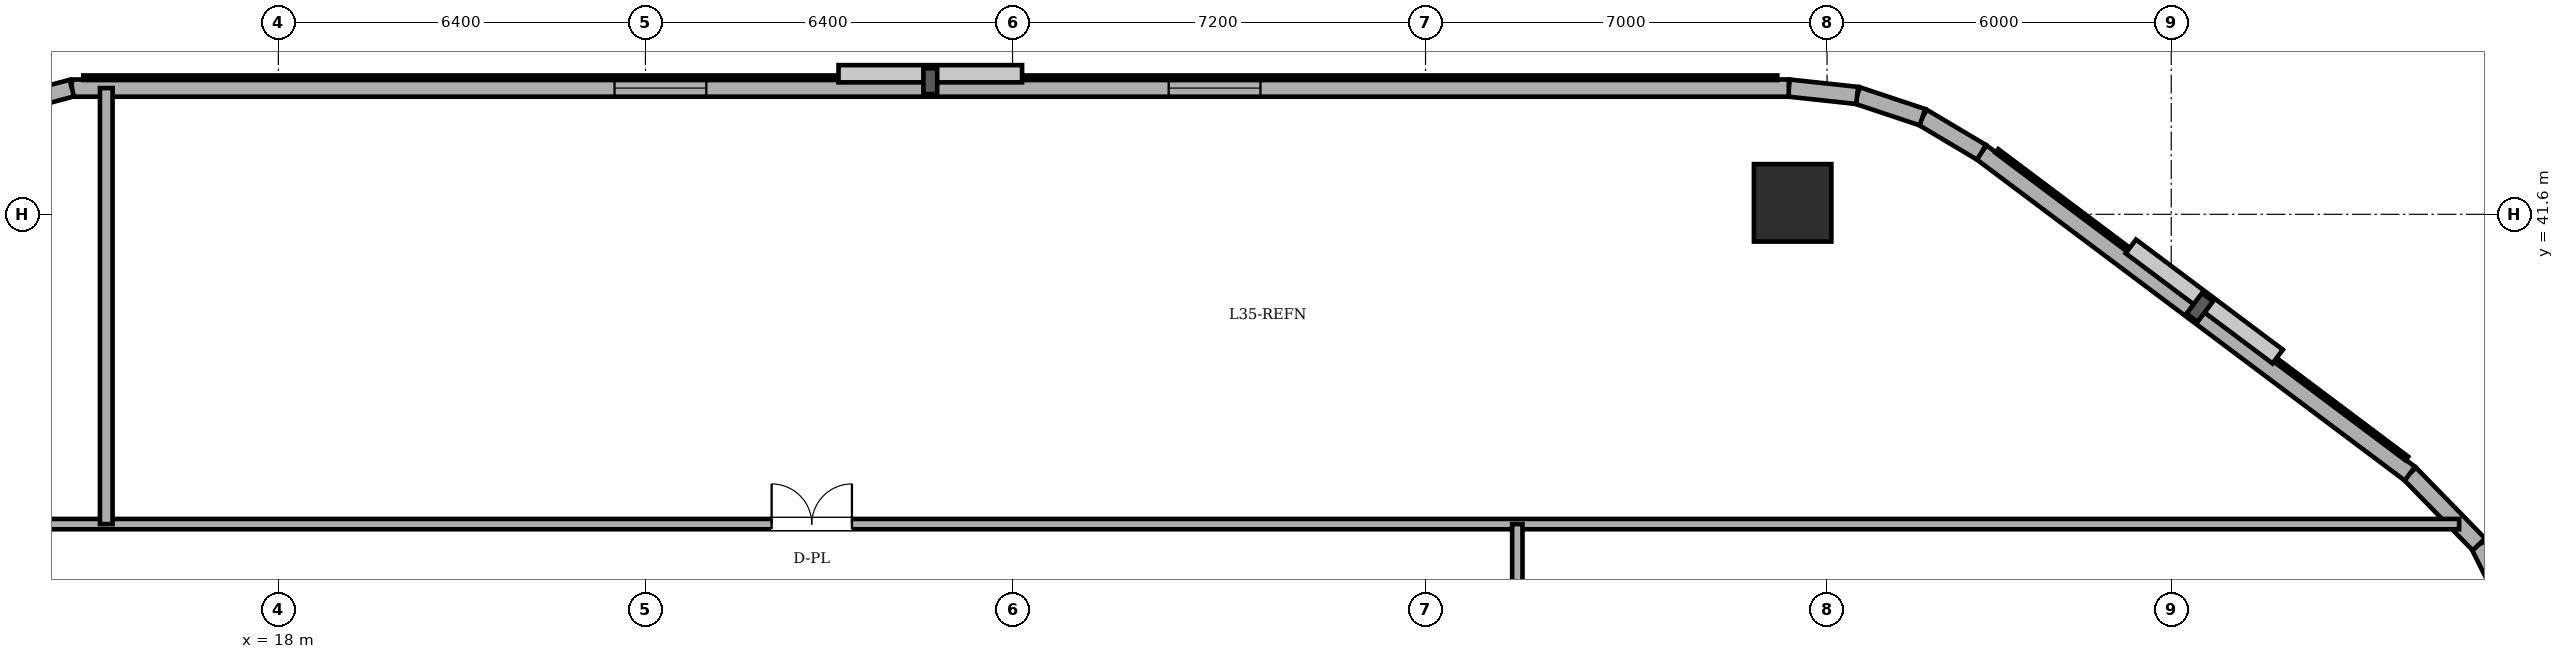
"""IFC4 building model, lengths in metres.
Left out: names, types, materials, properties, quantities, classifications, styles, units other than length and angle.
Written with IfcOpenShell. Run it as: python <this file> out.ifc"""

import sys

from ifc_helpers import new_model, si_unit, direction, frame, frame_2d, origin, origin_2d, place, context, subcontext, project, spatial, rectangle, circle, extrude, element, fill, save


model = new_model("IFC4")
c1 = context("Model", 3, precision=1e-05, world=origin(), true_north=direction((0.0, 1.0)))
c2 = subcontext(c1, "Body", "Model", "MODEL_VIEW")
j1 = project(units=[si_unit("LENGTHUNIT", "METRE"), si_unit("PLANEANGLEUNIT", "RADIAN")], contexts=[c1])
p1 = place(None, origin())
s1 = spatial("IfcSite", under=j1, at=p1, CompositionType="ELEMENT")
p2 = place(p1, origin())
s2 = spatial("IfcBuilding", under=s1, at=p2, CompositionType="ELEMENT")
p3 = place(p2, frame((0.0, 0.0, 133.1)))
s3 = spatial("IfcBuildingStorey", under=s2, at=p3, CompositionType="ELEMENT", Elevation=133.1)
p4 = place(p3, frame((44.4, 41.8, 0.0), z_axis=(0.0, 0.0, 1.0), x_axis=(1.0, 0.0, 0.0)))
e1 = element("IfcColumn", 1, at=p4, inside=s3, PredefinedType="COLUMN", context=c2, shape_type="SweptSolid", body=[
    extrude(circle(Radius=0.675, at=origin_2d()), origin(), (0.0, 0.0, 1.0), 2.96),
])
for number, where, z_axis, x_axis in (
    (2, (57.135, 34.304, 0.0), (0.0, 0.0, 1.0), (-0.447, 0.894, 0.0)),
    (3, (56.364, 35.846, 0.0), (0.0, 0.0, 1.0), (-0.698, 0.716, 0.0)),
):
    element("IfcWall", number, at=place(p3, frame(where, z_axis=z_axis, x_axis=x_axis)), inside=s3, PredefinedType="SOLIDWALL", context=c2, shape_type="SweptSolid", body=[
        extrude(rectangle(XDim=1.724, YDim=0.3, at=frame_2d((0.862, 0.0))), origin(), (0.0, 0.0, 1.0), 5.36),
    ])
p5 = place(p3, frame((55.16, 37.08, 0.0), z_axis=(0.0, 0.0, 1.0), x_axis=(-0.800012555607, 0.599983258826, 0.0)))
e4 = element("IfcWall", 4, at=p5, inside=s3, PredefinedType="SOLIDWALL", context=c2, shape_type="SweptSolid", body=[
    extrude(rectangle(XDim=9.333, YDim=0.3, at=frame_2d((4.667, 0.0))), origin(), (0.0, 0.0, 1.0), 5.36),
])
p6 = place(p3, frame((47.693, 42.68, 0.0), z_axis=(0.0, 0.0, 1.0), x_axis=(-0.859320591642, 0.511437308749, 0.0)))
e5 = element("IfcWall", 5, at=p6, inside=s3, PredefinedType="SOLIDWALL", context=c2, shape_type="SweptSolid", body=[
    extrude(rectangle(XDim=1.199, YDim=0.3, at=frame_2d((0.599, 0.0))), origin(), (0.0, 0.0, 1.0), 5.36),
])
p7 = place(p3, frame((46.663, 43.293, 0.0), z_axis=(0.0, 0.0, 1.0), x_axis=(-0.948744332129, 0.316044604847, 0.0)))
e6 = element("IfcWall", 6, at=p7, inside=s3, PredefinedType="SOLIDWALL", context=c2, shape_type="SweptSolid", body=[
    extrude(rectangle(XDim=1.2, YDim=0.3, at=frame_2d((0.6, 0.0))), origin(), (0.0, 0.0, 1.0), 5.36),
])
p8 = place(p3, frame((45.525, 43.672, 0.0), z_axis=(0.0, 0.0, 1.0), x_axis=(-0.994289103787, 0.106720092254, 0.0)))
e7 = element("IfcWall", 7, at=p8, inside=s3, PredefinedType="SOLIDWALL", context=c2, shape_type="SweptSolid", body=[
    extrude(rectangle(XDim=1.199, YDim=0.3, at=frame_2d((0.599, 0.0))), origin(), (0.0, 0.0, 1.0), 5.36),
])
p9 = place(p3, frame((44.333, 43.8, 0.0), z_axis=(0.0, 0.0, 1.0), x_axis=(-1.0, 0.0, 0.0)))
e8 = element("IfcWall", 8, at=p9, inside=s3, PredefinedType="SOLIDWALL", context=c2, shape_type="SweptSolid", body=[
    extrude(rectangle(XDim=29.933, YDim=0.3, at=frame_2d((14.967, 0.0))), origin(), (0.0, 0.0, 1.0), 5.36),
])
p10 = place(p9, frame((9.211, 0.0, 0.85)))
e9 = element("IfcOpeningElement", 9, at=p10, cuts=e8, PredefinedType="OPENING", context=c2, shape_type="SweptSolid", body=[
    extrude(rectangle(XDim=1.6, YDim=1.2, at=frame_2d((0.8, 0.6))), frame((0.0, 0.16, 0.0), z_axis=(0.0, -1.0, 0.0), x_axis=(1.0, 0.0, 0.0)), (0.0, 0.0, 1.0), 0.32),
])
p11 = place(p9, frame((18.872, 0.0, 0.85)))
e10 = element("IfcOpeningElement", 10, at=p11, cuts=e8, PredefinedType="OPENING", context=c2, shape_type="SweptSolid", body=[
    extrude(rectangle(XDim=1.6, YDim=1.2, at=frame_2d((0.8, 0.6))), frame((0.0, 0.16, 0.0), z_axis=(0.0, -1.0, 0.0), x_axis=(1.0, 0.0, 0.0)), (0.0, 0.0, 1.0), 0.32),
])
p12 = place(p3, frame((14.4, 43.8, 0.0), z_axis=(0.0, 0.0, 1.0), x_axis=(-0.965943540406, -0.258752926066, 0.0)))
e11 = element("IfcWall", 11, at=p12, inside=s3, PredefinedType="SOLIDWALL", context=c2, shape_type="SweptSolid", body=[
    extrude(rectangle(XDim=2.898, YDim=0.3, at=frame_2d((1.449, 0.0))), origin(), (0.0, 0.0, 1.0), 5.36),
])
p13 = place(p3, frame((13.5, 36.2, 0.0), z_axis=(0.0, 0.0, 1.0), x_axis=(1.0, 0.0, 0.0)))
e12 = element("IfcWall", 12, at=p13, inside=s3, PredefinedType="PARTITIONING", context=c2, shape_type="SweptSolid", body=[
    extrude(rectangle(XDim=42.519, YDim=0.18, at=frame_2d((21.26, 0.0))), origin(), (0.0, 0.0, 1.0), 5.36),
])
p14 = place(p13, frame((13.1, 0.0, 0.0)))
e13 = element("IfcOpeningElement", 13, at=p14, cuts=e12, PredefinedType="OPENING", context=c2, shape_type="SweptSolid", body=[
    extrude(rectangle(XDim=1.4, YDim=2.25, at=frame_2d((0.7, 1.125))), frame((0.0, 0.1, 0.0), z_axis=(0.0, -1.0, 0.0), x_axis=(1.0, 0.0, 0.0)), (0.0, 0.0, 1.0), 0.2),
])
p15 = place(p3, frame((15.0, 36.2, 0.0), z_axis=(0.0, 0.0, 1.0), x_axis=(0.0, 1.0, 0.0)))
e14 = element("IfcWall", 14, at=p15, inside=s3, PredefinedType="PARTITIONING", context=c2, shape_type="SweptSolid", body=[
    extrude(rectangle(XDim=7.6, YDim=0.22, at=frame_2d((3.8, 0.0))), origin(), (0.0, 0.0, 1.0), 5.36),
])
p16 = place(p3, frame((39.6, 11.8, 0.0), z_axis=(0.0, 0.0, 1.0), x_axis=(0.0, 1.0, 0.0)))
e15 = element("IfcWall", 15, at=p16, inside=s3, PredefinedType="PARTITIONING", context=c2, shape_type="SweptSolid", body=[
    extrude(rectangle(XDim=24.4, YDim=0.18, at=frame_2d((12.2, 0.0))), origin(), (0.0, 0.0, 1.0), 5.36),
])
p17 = place(p16, frame((18.07, 0.0, 0.0)))
e16 = element("IfcOpeningElement", 16, at=p17, cuts=e15, PredefinedType="OPENING", context=c2, shape_type="SweptSolid", body=[
    extrude(rectangle(XDim=1.4, YDim=2.25, at=frame_2d((0.7, 1.125))), frame((0.0, 0.1, 0.0), z_axis=(0.0, -1.0, 0.0), x_axis=(1.0, 0.0, 0.0)), (0.0, 0.0, 1.0), 0.2),
])
p18 = place(p16, frame((5.6, 0.0, 0.0)))
e17 = element("IfcOpeningElement", 17, at=p18, cuts=e15, PredefinedType="OPENING", context=c2, shape_type="SweptSolid", body=[
    extrude(rectangle(XDim=1.4, YDim=2.25, at=frame_2d((0.7, 1.125))), frame((0.0, 0.1, 0.0), z_axis=(0.0, -1.0, 0.0), x_axis=(1.0, 0.0, 0.0)), (0.0, 0.0, 1.0), 0.2),
])
p19 = place(p16, frame((9.7, 0.0, 0.0)))
e18 = element("IfcOpeningElement", 18, at=p19, cuts=e15, PredefinedType="OPENING", context=c2, shape_type="SweptSolid", body=[
    extrude(rectangle(XDim=1.4, YDim=2.25, at=frame_2d((0.7, 1.125))), frame((0.0, 0.1, 0.0), z_axis=(0.0, -1.0, 0.0), x_axis=(1.0, 0.0, 0.0)), (0.0, 0.0, 1.0), 0.2),
])
p20 = place(p10, origin())
e19 = element("IfcWindow", 19, at=p20, inside=s3, PartitioningType="DOUBLE_PANEL_VERTICAL", PredefinedType="WINDOW", context=c2, shape_type="SweptSolid", body=[
    extrude(rectangle(XDim=1.6, YDim=1.2, at=frame_2d((0.8, 0.6))), frame((0.0, 0.03, 0.0), z_axis=(0.0, -1.0, 0.0), x_axis=(1.0, 0.0, 0.0)), (0.0, 0.0, 1.0), 0.06),
])
fill(e9, e19)
p21 = place(p11, origin())
e20 = element("IfcWindow", 20, at=p21, inside=s3, PartitioningType="DOUBLE_PANEL_VERTICAL", PredefinedType="WINDOW", context=c2, shape_type="SweptSolid", body=[
    extrude(rectangle(XDim=1.6, YDim=1.2, at=frame_2d((0.8, 0.6))), frame((0.0, 0.03, 0.0), z_axis=(0.0, -1.0, 0.0), x_axis=(1.0, 0.0, 0.0)), (0.0, 0.0, 1.0), 0.06),
])
fill(e10, e20)
p22 = place(p14, origin())
e21 = element("IfcDoor", 21, at=p22, inside=s3, OperationType="DOUBLE_DOOR_SINGLE_SWING", PredefinedType="DOOR", context=c2, shape_type="SweptSolid", body=[
    extrude(rectangle(XDim=1.4, YDim=2.25, at=frame_2d((0.7, 1.125))), frame((0.0, 0.025, 0.0), z_axis=(0.0, -1.0, 0.0), x_axis=(1.0, 0.0, 0.0)), (0.0, 0.0, 1.0), 0.05),
])
fill(e13, e21)
save(model, sys.argv[1])
